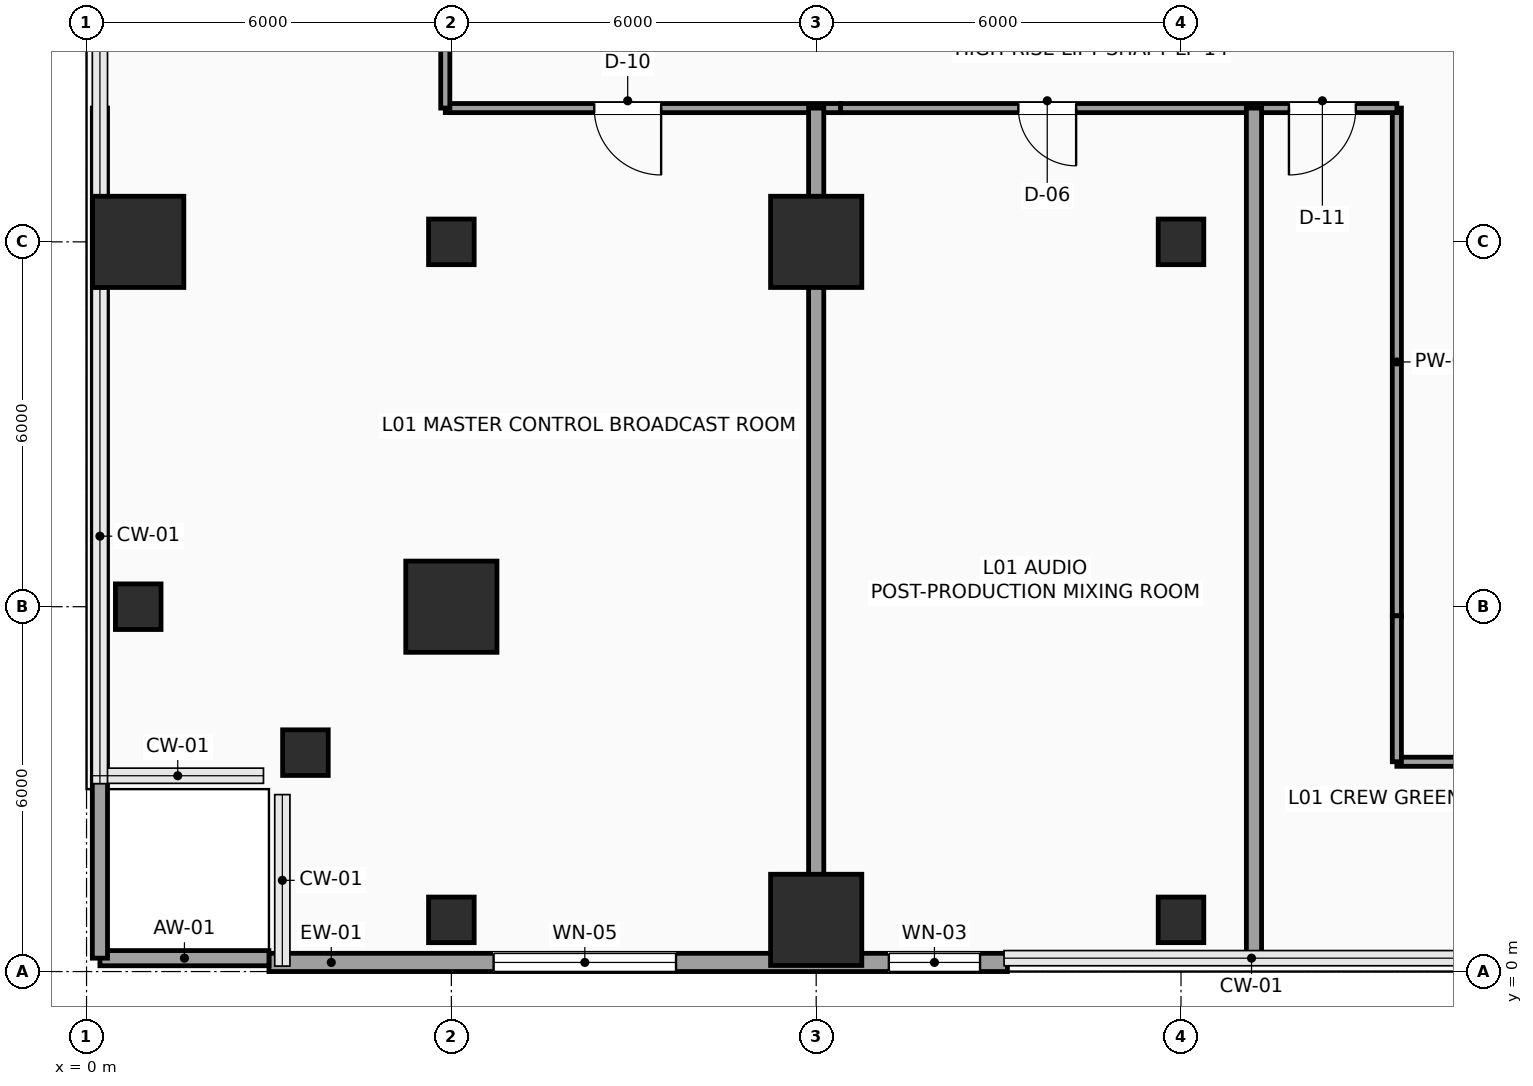
"""IFC4 building model, lengths in metres.
Left out: names, types, materials, properties, quantities, classifications, styles, units other than length and angle.
Written with IfcOpenShell. Run it as: python <this file> out.ifc"""

import sys

from ifc_helpers import new_model, si_unit, direction, frame, frame_2d, origin, origin_2d, place, context, subcontext, project, spatial, rectangle, hollow_rectangle, extrude, element, fill, save


model = new_model("IFC4")
c1 = context("Model", 3, precision=1e-05, world=origin(), true_north=direction((0.0, 1.0)))
c2 = subcontext(c1, "Body", "Model", "MODEL_VIEW")
j1 = project(units=[si_unit("LENGTHUNIT", "METRE"), si_unit("PLANEANGLEUNIT", "RADIAN")], contexts=[c1])
p1 = place(None, origin())
s1 = spatial("IfcSite", under=j1, at=p1, CompositionType="ELEMENT")
p2 = place(p1, origin())
s2 = spatial("IfcBuilding", under=s1, at=p2, CompositionType="ELEMENT")
p3 = place(p2, frame((0.0, 0.0, 5.7)))
s3 = spatial("IfcBuildingStorey", under=s2, at=p3, CompositionType="ELEMENT", Elevation=5.7)
for number, where, z_axis, x_axis in (
    (1, (3.6, 3.6, 0.0), (0.0, 0.0, 1.0), (1.0, 0.0, 0.0)),
    (2, (0.85, 6.0, 0.0), (0.0, 0.0, 1.0), (1.0, 0.0, 0.0)),
):
    element("IfcColumn", number, at=place(p3, frame(where, z_axis=z_axis, x_axis=x_axis)), inside=s3, PredefinedType="COLUMN", context=c2, shape_type="SweptSolid", body=[
        extrude(hollow_rectangle(XDim=0.75, YDim=0.75, WallThickness=0.035, InnerFilletRadius=0.035, OuterFilletRadius=0.05, at=origin_2d()), origin(), (0.0, 0.0, 1.0), 5.4),
    ])
p4 = place(p3, frame((0.85, 12.0, 0.0), z_axis=(0.0, 0.0, 1.0), x_axis=(1.0, 0.0, 0.0)))
e3 = element("IfcColumn", 3, at=p4, inside=s3, PredefinedType="COLUMN", context=c2, shape_type="SweptSolid", body=[
    extrude(rectangle(XDim=1.5, YDim=1.5, at=origin_2d()), origin(), (0.0, 0.0, 1.0), 5.4),
])
p5 = place(p3, frame((6.0, 0.85, 0.0), z_axis=(0.0, 0.0, 1.0), x_axis=(1.0, 0.0, 0.0)))
e4 = element("IfcColumn", 4, at=p5, inside=s3, PredefinedType="COLUMN", context=c2, shape_type="SweptSolid", body=[
    extrude(hollow_rectangle(XDim=0.75, YDim=0.75, WallThickness=0.035, InnerFilletRadius=0.035, OuterFilletRadius=0.05, at=origin_2d()), origin(), (0.0, 0.0, 1.0), 5.4),
])
p6 = place(p3, frame((6.0, 6.0, 0.0), z_axis=(0.0, 0.0, 1.0), x_axis=(1.0, 0.0, 0.0)))
e5 = element("IfcColumn", 5, at=p6, inside=s3, PredefinedType="COLUMN", context=c2, shape_type="SweptSolid", body=[
    extrude(rectangle(XDim=1.5, YDim=1.5, at=origin_2d()), origin(), (0.0, 0.0, 1.0), 5.4),
])
p7 = place(p3, frame((6.0, 12.0, 0.0), z_axis=(0.0, 0.0, 1.0), x_axis=(1.0, 0.0, 0.0)))
e6 = element("IfcColumn", 6, at=p7, inside=s3, PredefinedType="COLUMN", context=c2, shape_type="SweptSolid", body=[
    extrude(hollow_rectangle(XDim=0.75, YDim=0.75, WallThickness=0.035, InnerFilletRadius=0.035, OuterFilletRadius=0.05, at=origin_2d()), origin(), (0.0, 0.0, 1.0), 5.4),
])
for number, where, z_axis, x_axis in (
    (7, (12.0, 0.85, 0.0), (0.0, 0.0, 1.0), (1.0, 0.0, 0.0)),
    (8, (12.0, 12.0, 0.0), (0.0, 0.0, 1.0), (1.0, 0.0, 0.0)),
):
    element("IfcColumn", number, at=place(p3, frame(where, z_axis=z_axis, x_axis=x_axis)), inside=s3, PredefinedType="COLUMN", context=c2, shape_type="SweptSolid", body=[
        extrude(rectangle(XDim=1.5, YDim=1.5, at=origin_2d()), origin(), (0.0, 0.0, 1.0), 5.4),
    ])
for number, where, z_axis, x_axis in (
    (9, (18.0, 0.85, 0.0), (0.0, 0.0, 1.0), (1.0, 0.0, 0.0)),
    (10, (18.0, 12.0, 0.0), (0.0, 0.0, 1.0), (1.0, 0.0, 0.0)),
):
    element("IfcColumn", number, at=place(p3, frame(where, z_axis=z_axis, x_axis=x_axis)), inside=s3, PredefinedType="COLUMN", context=c2, shape_type="SweptSolid", body=[
        extrude(hollow_rectangle(XDim=0.75, YDim=0.75, WallThickness=0.035, InnerFilletRadius=0.035, OuterFilletRadius=0.05, at=origin_2d()), origin(), (0.0, 0.0, 1.0), 5.4),
    ])
p8 = place(p3, frame((15.145, 0.15, 0.0), z_axis=(0.0, 0.0, 1.0), x_axis=(-1.0, 0.0, 0.0)))
e11 = element("IfcWall", 11, at=p8, inside=s3, PredefinedType="SOLIDWALL", context=c2, shape_type="SweptSolid", body=[
    extrude(rectangle(XDim=12.145, YDim=0.3, at=frame_2d((6.073, 0.0))), origin(), (0.0, 0.0, 1.0), 5.125),
])
p9 = place(p8, frame((0.45, 0.0, 1.0)))
e12 = element("IfcOpeningElement", 12, at=p9, cuts=e11, PredefinedType="OPENING", context=c2, shape_type="SweptSolid", body=[
    extrude(rectangle(XDim=1.5, YDim=1.8, at=frame_2d((0.75, 0.9))), frame((0.0, 0.16, 0.0), z_axis=(0.0, -1.0, 0.0), x_axis=(1.0, 0.0, 0.0)), (0.0, 0.0, 1.0), 0.32),
])
p10 = place(p8, frame((5.45, 0.0, 1.0)))
e13 = element("IfcOpeningElement", 13, at=p10, cuts=e11, PredefinedType="OPENING", context=c2, shape_type="SweptSolid", body=[
    extrude(rectangle(XDim=3.0, YDim=2.4, at=frame_2d((1.5, 1.2))), frame((0.0, 0.16, 0.0), z_axis=(0.0, -1.0, 0.0), x_axis=(1.0, 0.0, 0.0)), (0.0, 0.0, 1.0), 0.32),
])
p11 = place(p3, frame((21.55, 5.85, 0.0), z_axis=(0.0, 0.0, 1.0), x_axis=(0.0, 1.0, 0.0)))
e14 = element("IfcWall", 14, at=p11, inside=s3, PredefinedType="PARTITIONING", context=c2, shape_type="SweptSolid", body=[
    extrude(rectangle(XDim=8.35, YDim=0.15, at=frame_2d((4.175, 0.0))), origin(), (0.0, 0.0, 1.0), 5.125),
])
p12 = place(p3, frame((21.55, 14.2, 0.0), z_axis=(0.0, 0.0, 1.0), x_axis=(-1.0, 0.0, 0.0)))
e15 = element("IfcWall", 15, at=p12, inside=s3, PredefinedType="PARTITIONING", context=c2, shape_type="SweptSolid", body=[
    extrude(rectangle(XDim=9.15, YDim=0.15, at=frame_2d((4.575, 0.0))), origin(), (0.0, 0.0, 1.0), 5.125),
])
p13 = place(p12, frame((5.275, 0.0, 0.0)))
e16 = element("IfcOpeningElement", 16, at=p13, cuts=e15, PredefinedType="OPENING", context=c2, shape_type="SweptSolid", body=[
    extrude(rectangle(XDim=0.95, YDim=2.15, at=frame_2d((0.475, 1.075))), frame((0.0, 0.085, 0.0), z_axis=(0.0, -1.0, 0.0), x_axis=(1.0, 0.0, 0.0)), (0.0, 0.0, 1.0), 0.17),
])
p14 = place(p12, frame((0.675, 0.0, 0.0)))
e17 = element("IfcOpeningElement", 17, at=p14, cuts=e15, PredefinedType="OPENING", context=c2, shape_type="SweptSolid", body=[
    extrude(rectangle(XDim=1.1, YDim=2.25, at=frame_2d((0.55, 1.125))), frame((0.0, 0.085, 0.0), z_axis=(0.0, -1.0, 0.0), x_axis=(1.0, 0.0, 0.0)), (0.0, 0.0, 1.0), 0.17),
])
p15 = place(p3, frame((12.4, 14.2, 0.0), z_axis=(0.0, 0.0, 1.0), x_axis=(-1.0, 0.0, 0.0)))
e18 = element("IfcWall", 18, at=p15, inside=s3, PredefinedType="PARTITIONING", context=c2, shape_type="SweptSolid", body=[
    extrude(rectangle(XDim=6.5, YDim=0.15, at=frame_2d((3.25, 0.0))), origin(), (0.0, 0.0, 1.0), 5.125),
])
p16 = place(p15, frame((2.95, 0.0, 0.0)))
e19 = element("IfcOpeningElement", 19, at=p16, cuts=e18, PredefinedType="OPENING", context=c2, shape_type="SweptSolid", body=[
    extrude(rectangle(XDim=1.1, YDim=2.25, at=frame_2d((0.55, 1.125))), frame((0.0, 0.085, 0.0), z_axis=(0.0, -1.0, 0.0), x_axis=(1.0, 0.0, 0.0)), (0.0, 0.0, 1.0), 0.17),
])
p17 = place(p3, frame((5.9, 14.2, 0.0), z_axis=(0.0, 0.0, 1.0), x_axis=(0.0, 1.0, 0.0)))
e20 = element("IfcWall", 20, at=p17, inside=s3, PredefinedType="PARTITIONING", context=c2, shape_type="SweptSolid", body=[
    extrude(rectangle(XDim=2.35, YDim=0.15, at=frame_2d((1.175, 0.0))), origin(), (0.0, 0.0, 1.0), 4.467),
])
p18 = place(p3, frame((23.98, 3.45, 0.0), z_axis=(0.0, 0.0, 1.0), x_axis=(-1.0, 0.0, 0.0)))
e21 = element("IfcWall", 21, at=p18, inside=s3, PredefinedType="PARTITIONING", context=c2, shape_type="SweptSolid", body=[
    extrude(rectangle(XDim=2.43, YDim=0.15, at=frame_2d((1.215, 0.0))), origin(), (0.0, 0.0, 1.0), 4.517),
])
p19 = place(p3, frame((21.55, 3.45, 0.0), z_axis=(0.0, 0.0, 1.0), x_axis=(0.0, 1.0, 0.0)))
e22 = element("IfcWall", 22, at=p19, inside=s3, PredefinedType="PARTITIONING", context=c2, shape_type="SweptSolid", body=[
    extrude(rectangle(XDim=2.4, YDim=0.15, at=frame_2d((1.2, 0.0))), origin(), (0.0, 0.0, 1.0), 5.125),
])
p20 = place(p3, frame((0.22, 0.22, 0.0), z_axis=(0.0, 0.0, 1.0), x_axis=(1.0, 0.0, 0.0)))
e23 = element("IfcWall", 23, at=p20, inside=s3, PredefinedType="PARTITIONING", context=c2, shape_type="SweptSolid", body=[
    extrude(rectangle(XDim=2.78, YDim=0.25, at=frame_2d((1.39, 0.0))), origin(), (0.0, 0.0, 1.0), 5.125),
])
p21 = place(p3, frame((0.22, 0.22, 0.0), z_axis=(0.0, 0.0, 1.0), x_axis=(0.0, 1.0, 0.0)))
e24 = element("IfcWall", 24, at=p21, inside=s3, PredefinedType="PARTITIONING", context=c2, shape_type="SweptSolid", body=[
    extrude(rectangle(XDim=13.98, YDim=0.25, at=frame_2d((6.99, 0.0))), origin(), (0.0, 0.0, 1.0), 5.125),
])
p22 = place(p3, frame((12.0, 0.22, 0.0), z_axis=(0.0, 0.0, 1.0), x_axis=(0.0, 1.0, 0.0)))
e25 = element("IfcWall", 25, at=p22, inside=s3, PredefinedType="PARTITIONING", context=c2, shape_type="SweptSolid", body=[
    extrude(rectangle(XDim=13.98, YDim=0.25, at=frame_2d((6.99, 0.0))), origin(), (0.0, 0.0, 1.0), 4.217),
])
p23 = place(p3, frame((19.2, 0.22, 0.0), z_axis=(0.0, 0.0, 1.0), x_axis=(0.0, 1.0, 0.0)))
e26 = element("IfcWall", 26, at=p23, inside=s3, PredefinedType="PARTITIONING", context=c2, shape_type="SweptSolid", body=[
    extrude(rectangle(XDim=13.98, YDim=0.25, at=frame_2d((6.99, 0.0))), origin(), (0.0, 0.0, 1.0), 5.125),
])
p24 = place(p9, origin())
e27 = element("IfcWindow", 27, at=p24, inside=s3, PartitioningType="SINGLE_PANEL", PredefinedType="WINDOW", context=c2, shape_type="SweptSolid", body=[
    extrude(rectangle(XDim=1.5, YDim=1.8, at=frame_2d((0.75, 0.9))), frame((0.0, 0.03, 0.0), z_axis=(0.0, -1.0, 0.0), x_axis=(1.0, 0.0, 0.0)), (0.0, 0.0, 1.0), 0.06),
])
fill(e12, e27)
p25 = place(p10, origin())
e28 = element("IfcWindow", 28, at=p25, inside=s3, PartitioningType="SINGLE_PANEL", PredefinedType="WINDOW", context=c2, shape_type="SweptSolid", body=[
    extrude(rectangle(XDim=3.0, YDim=2.4, at=frame_2d((1.5, 1.2))), frame((0.0, 0.03, 0.0), z_axis=(0.0, -1.0, 0.0), x_axis=(1.0, 0.0, 0.0)), (0.0, 0.0, 1.0), 0.06),
])
fill(e13, e28)
p26 = place(p13, origin())
e29 = element("IfcDoor", 29, at=p26, inside=s3, OperationType="SINGLE_SWING_LEFT", PredefinedType="DOOR", context=c2, shape_type="SweptSolid", body=[
    extrude(rectangle(XDim=0.95, YDim=2.15, at=frame_2d((0.475, 1.075))), frame((0.0, 0.025, 0.0), z_axis=(0.0, -1.0, 0.0), x_axis=(1.0, 0.0, 0.0)), (0.0, 0.0, 1.0), 0.05),
])
fill(e16, e29)
p27 = place(p14, origin())
e30 = element("IfcDoor", 30, at=p27, inside=s3, OperationType="SINGLE_SWING_RIGHT", PredefinedType="DOOR", context=c2, shape_type="SweptSolid", body=[
    extrude(rectangle(XDim=1.1, YDim=2.25, at=frame_2d((0.55, 1.125))), frame((0.0, 0.025, 0.0), z_axis=(0.0, -1.0, 0.0), x_axis=(1.0, 0.0, 0.0)), (0.0, 0.0, 1.0), 0.05),
])
fill(e17, e30)
p28 = place(p16, origin())
e31 = element("IfcDoor", 31, at=p28, inside=s3, OperationType="SINGLE_SWING_LEFT", PredefinedType="DOOR", context=c2, shape_type="SweptSolid", body=[
    extrude(rectangle(XDim=1.1, YDim=2.25, at=frame_2d((0.55, 1.125))), frame((0.0, 0.025, 0.0), z_axis=(0.0, -1.0, 0.0), x_axis=(1.0, 0.0, 0.0)), (0.0, 0.0, 1.0), 0.05),
])
fill(e19, e31)
save(model, sys.argv[1])
